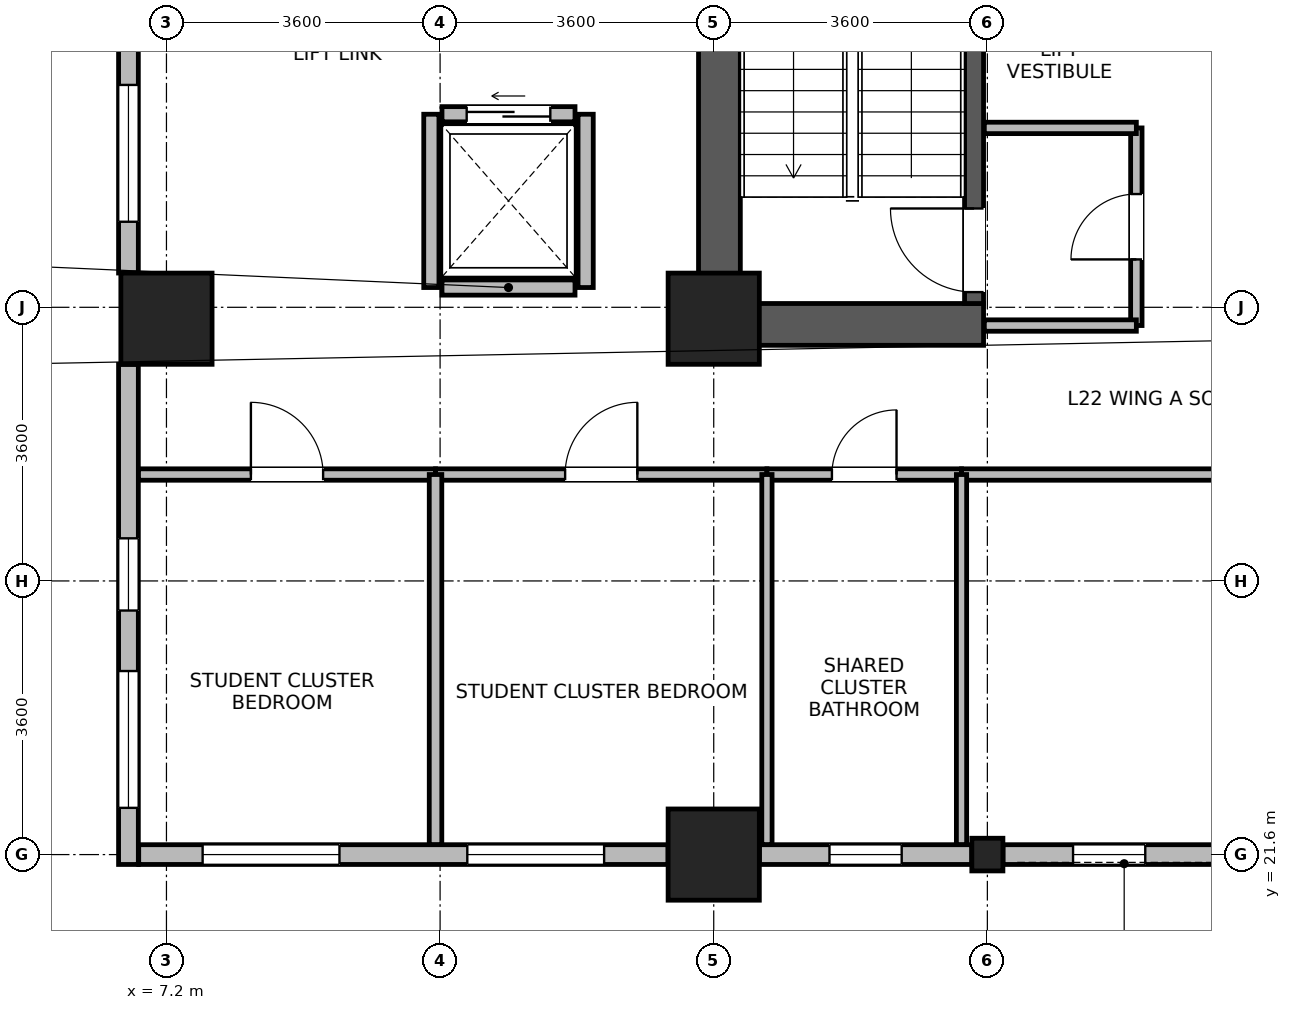
"""IFC4 building model, lengths in metres.
Left out: names, types, materials, properties, quantities, classifications, styles, units other than length and angle.
Written with IfcOpenShell. Run it as: python <this file> out.ifc"""

import sys

from ifc_helpers import new_model, si_unit, direction, frame, frame_2d, origin, origin_2d, place, context, subcontext, project, spatial, rectangle, i_section, extrude, source, transform, mapped, element, fill, save


model = new_model("IFC4")
c1 = context("Model", 3, precision=1e-05, world=origin(), true_north=direction((0.0, 1.0)))
c2 = subcontext(c1, "Body", "Model", "MODEL_VIEW")
j1 = project(units=[si_unit("LENGTHUNIT", "METRE"), si_unit("PLANEANGLEUNIT", "RADIAN")], contexts=[c1])
p1 = place(None, origin())
s1 = spatial("IfcSite", under=j1, at=p1, CompositionType="ELEMENT")
p2 = place(p1, origin())
s2 = spatial("IfcBuilding", under=s1, at=p2, CompositionType="ELEMENT")
p3 = place(p2, frame((0.0, 0.0, 89.7)))
s3 = spatial("IfcBuildingStorey", under=s2, at=p3, CompositionType="ELEMENT", Elevation=89.7)
p4 = place(p3, frame((14.475, 28.3, 0.0), z_axis=(0.0, 0.0, 1.0), x_axis=(0.0, 1.0, 0.0)))
e1 = element("IfcWall", 1, at=p4, inside=s3, PredefinedType="SHEAR", context=c2, shape_type="SweptSolid", body=[
    extrude(rectangle(XDim=8.1, YDim=0.55, at=frame_2d((4.05, 0.0))), origin(), (0.0, 0.0, 1.0), 3.45),
])
p5 = place(p3, frame((14.75, 28.575, 0.0), z_axis=(0.0, 0.0, 1.0), x_axis=(1.0, 0.0, 0.0)))
e2 = element("IfcWall", 2, at=p5, inside=s3, PredefinedType="SHEAR", context=c2, shape_type="SweptSolid", body=[
    extrude(rectangle(XDim=3.2, YDim=0.55, at=frame_2d((1.6, 0.0))), origin(), (0.0, 0.0, 1.0), 3.45),
])
p6 = place(p3, frame((17.825, 28.85, 0.0), z_axis=(0.0, 0.0, 1.0), x_axis=(0.0, 1.0, 0.0)))
e3 = element("IfcWall", 3, at=p6, inside=s3, PredefinedType="SHEAR", context=c2, shape_type="SweptSolid", body=[
    extrude(rectangle(XDim=7.0, YDim=0.25, at=frame_2d((3.5, 0.0))), origin(), (0.0, 0.0, 1.0), 3.45),
])
p7 = place(p6, frame((0.15, 0.0, 0.0)))
e4 = element("IfcOpeningElement", 4, at=p7, cuts=e3, PredefinedType="OPENING", context=c2, shape_type="SweptSolid", body=[
    extrude(rectangle(XDim=1.1, YDim=2.08, at=frame_2d((0.55, 1.04))), frame((0.0, 0.135, 0.0), z_axis=(0.0, -1.0, 0.0), x_axis=(1.0, 0.0, 0.0)), (0.0, 0.0, 1.0), 0.27),
])
m1 = source(origin(), c2, "Body", "SweptSolid", [
    extrude(rectangle(XDim=1.2, YDim=1.2, at=origin_2d()), origin(), (0.0, 0.0, 1.0), 3.7),
])
for number, where, z_axis, x_axis in (
    (5, (7.2, 28.65, 0.0), (0.0, 0.0, 1.0), (1.0, 0.0, 0.0)),
    (6, (14.4, 21.6, 0.0), (0.0, 0.0, 1.0), (1.0, 0.0, 0.0)),
    (7, (14.4, 28.65, 0.0), (0.0, 0.0, 1.0), (1.0, 0.0, 0.0)),
):
    element("IfcColumn", number, at=place(p3, frame(where, z_axis=z_axis, x_axis=x_axis)), inside=s3, PredefinedType="COLUMN", context=c2, shape_type="MappedRepresentation", body=[
        mapped(m1, transform((0.0, 0.0, 0.0), x_axis=(1.0, 0.0, 0.0), y_axis=(0.0, 1.0, 0.0), z_axis=(0.0, 0.0, 1.0), scale=1.0)),
    ])
m2 = source(origin(), c2, "Body", "SweptSolid", [
    extrude(i_section(OverallWidth=0.409, OverallDepth=0.43, WebThickness=0.024, FlangeThickness=0.033, FilletRadius=0.015, at=origin_2d()), origin(), (0.0, 0.0, 1.0), 3.7),
])
p8 = place(p3, frame((18.0, 21.6, 0.0), z_axis=(0.0, 0.0, 1.0), x_axis=(1.0, 0.0, 0.0)))
e8 = element("IfcColumn", 8, at=p8, inside=s3, PredefinedType="COLUMN", context=c2, shape_type="MappedRepresentation", body=[
    mapped(m2, transform((0.0, 0.0, 0.0), x_axis=(1.0, 0.0, 0.0), y_axis=(0.0, 1.0, 0.0), z_axis=(0.0, 0.0, 1.0), scale=1.0)),
])
p9 = place(p3, frame((6.7, 29.251, 0.0), z_axis=(0.0, 0.0, 1.0), x_axis=(0.0, 1.0, 0.0)))
e9 = element("IfcWall", 9, at=p9, inside=s3, PredefinedType="STANDARD", context=c2, shape_type="SweptSolid", body=[
    extrude(rectangle(XDim=6.298, YDim=0.26, at=frame_2d((3.149, 0.0))), origin(), (0.0, 0.0, 1.0), 3.43),
])
p10 = place(p9, frame((0.675, 0.0, 0.85)))
e10 = element("IfcOpeningElement", 10, at=p10, cuts=e9, PredefinedType="OPENING", context=c2, shape_type="SweptSolid", body=[
    extrude(rectangle(XDim=1.8, YDim=1.85, at=frame_2d((0.9, 0.925))), frame((0.0, 0.14, 0.0), z_axis=(0.0, -1.0, 0.0), x_axis=(1.0, 0.0, 0.0)), (0.0, 0.0, 1.0), 0.28),
])
p11 = place(p9, frame((3.823, 0.0, 0.85)))
e11 = element("IfcOpeningElement", 11, at=p11, cuts=e9, PredefinedType="OPENING", context=c2, shape_type="SweptSolid", body=[
    extrude(rectangle(XDim=1.8, YDim=1.85, at=frame_2d((0.9, 0.925))), frame((0.0, 0.14, 0.0), z_axis=(0.0, -1.0, 0.0), x_axis=(1.0, 0.0, 0.0)), (0.0, 0.0, 1.0), 0.28),
])
p12 = place(p3, frame((6.7, 21.47, 0.0), z_axis=(0.0, 0.0, 1.0), x_axis=(0.0, 1.0, 0.0)))
e12 = element("IfcWall", 12, at=p12, inside=s3, PredefinedType="STANDARD", context=c2, shape_type="SweptSolid", body=[
    extrude(rectangle(XDim=6.579, YDim=0.26, at=frame_2d((3.29, 0.0))), origin(), (0.0, 0.0, 1.0), 3.43),
])
p13 = place(p12, frame((0.745, 0.0, 0.85)))
e13 = element("IfcOpeningElement", 13, at=p13, cuts=e12, PredefinedType="OPENING", context=c2, shape_type="SweptSolid", body=[
    extrude(rectangle(XDim=1.8, YDim=1.85, at=frame_2d((0.9, 0.925))), frame((0.0, 0.14, 0.0), z_axis=(0.0, -1.0, 0.0), x_axis=(1.0, 0.0, 0.0)), (0.0, 0.0, 1.0), 0.28),
])
p14 = place(p12, frame((3.341, 0.0, 0.85)))
e14 = element("IfcOpeningElement", 14, at=p14, cuts=e12, PredefinedType="OPENING", context=c2, shape_type="SweptSolid", body=[
    extrude(rectangle(XDim=0.95, YDim=1.75, at=frame_2d((0.475, 0.875))), frame((0.0, 0.14, 0.0), z_axis=(0.0, -1.0, 0.0), x_axis=(1.0, 0.0, 0.0)), (0.0, 0.0, 1.0), 0.28),
])
p15 = place(p3, frame((13.799, 21.6, 0.0), z_axis=(0.0, 0.0, 1.0), x_axis=(-1.0, 0.0, 0.0)))
e15 = element("IfcWall", 15, at=p15, inside=s3, PredefinedType="STANDARD", context=c2, shape_type="SweptSolid", body=[
    extrude(rectangle(XDim=6.964, YDim=0.26, at=frame_2d((3.482, 0.0))), origin(), (0.0, 0.0, 1.0), 3.43),
])
p16 = place(p15, frame((0.841, 0.0, 0.85)))
e16 = element("IfcOpeningElement", 16, at=p16, cuts=e15, PredefinedType="OPENING", context=c2, shape_type="SweptSolid", body=[
    extrude(rectangle(XDim=1.8, YDim=1.85, at=frame_2d((0.9, 0.925))), frame((0.0, 0.14, 0.0), z_axis=(0.0, -1.0, 0.0), x_axis=(1.0, 0.0, 0.0)), (0.0, 0.0, 1.0), 0.28),
])
p17 = place(p15, frame((4.323, 0.0, 0.85)))
e17 = element("IfcOpeningElement", 17, at=p17, cuts=e15, PredefinedType="OPENING", context=c2, shape_type="SweptSolid", body=[
    extrude(rectangle(XDim=1.8, YDim=1.85, at=frame_2d((0.9, 0.925))), frame((0.0, 0.14, 0.0), z_axis=(0.0, -1.0, 0.0), x_axis=(1.0, 0.0, 0.0)), (0.0, 0.0, 1.0), 0.28),
])
p18 = place(p3, frame((17.794, 21.6, 0.0), z_axis=(0.0, 0.0, 1.0), x_axis=(-1.0, 0.0, 0.0)))
e18 = element("IfcWall", 18, at=p18, inside=s3, PredefinedType="STANDARD", context=c2, shape_type="SweptSolid", body=[
    extrude(rectangle(XDim=2.793, YDim=0.26, at=frame_2d((1.397, 0.0))), origin(), (0.0, 0.0, 1.0), 2.93),
])
p19 = place(p18, frame((0.922, 0.0, 0.85)))
e19 = element("IfcOpeningElement", 19, at=p19, cuts=e18, PredefinedType="OPENING", context=c2, shape_type="SweptSolid", body=[
    extrude(rectangle(XDim=0.95, YDim=1.75, at=frame_2d((0.475, 0.875))), frame((0.0, 0.14, 0.0), z_axis=(0.0, -1.0, 0.0), x_axis=(1.0, 0.0, 0.0)), (0.0, 0.0, 1.0), 0.28),
])
p20 = place(p3, frame((20.999, 21.6, 0.0), z_axis=(0.0, 0.0, 1.0), x_axis=(-1.0, 0.0, 0.0)))
e20 = element("IfcWall", 20, at=p20, inside=s3, PredefinedType="STANDARD", context=c2, shape_type="SweptSolid", body=[
    extrude(rectangle(XDim=2.793, YDim=0.26, at=frame_2d((1.397, 0.0))), origin(), (0.0, 0.0, 1.0), 2.93),
])
p21 = place(p20, frame((0.922, 0.0, 0.85)))
e21 = element("IfcOpeningElement", 21, at=p21, cuts=e20, PredefinedType="OPENING", context=c2, shape_type="SweptSolid", body=[
    extrude(rectangle(XDim=0.95, YDim=1.75, at=frame_2d((0.475, 0.875))), frame((0.0, 0.14, 0.0), z_axis=(0.0, -1.0, 0.0), x_axis=(1.0, 0.0, 0.0)), (0.0, 0.0, 1.0), 0.28),
])
p22 = place(p3, frame((10.825, 29.06, 0.0), z_axis=(0.0, 0.0, 1.0), x_axis=(1.0, 0.0, 0.0)))
e22 = element("IfcWall", 22, at=p22, inside=s3, PredefinedType="PARTITIONING", context=c2, shape_type="SweptSolid", body=[
    extrude(rectangle(XDim=1.75, YDim=0.2, at=frame_2d((0.875, 0.0))), origin(), (0.0, 0.0, 1.0), 3.43),
])
p23 = place(p3, frame((10.825, 31.34, 0.0), z_axis=(0.0, 0.0, 1.0), x_axis=(1.0, 0.0, 0.0)))
e23 = element("IfcWall", 23, at=p23, inside=s3, PredefinedType="PARTITIONING", context=c2, shape_type="SweptSolid", body=[
    extrude(rectangle(XDim=1.75, YDim=0.2, at=frame_2d((0.875, 0.0))), origin(), (0.0, 0.0, 1.0), 3.43),
])
p24 = place(p23, frame((0.325, 0.0, 0.0)))
e24 = element("IfcOpeningElement", 24, at=p24, cuts=e23, PredefinedType="OPENING", context=c2, shape_type="SweptSolid", body=[
    extrude(rectangle(XDim=1.1, YDim=2.12, at=frame_2d((0.55, 1.06))), frame((0.0, 0.11, 0.0), z_axis=(0.0, -1.0, 0.0), x_axis=(1.0, 0.0, 0.0)), (0.0, 0.0, 1.0), 0.22),
])
for number, where, z_axis, x_axis in (
    (25, (10.685, 29.06, 0.0), (0.0, 0.0, 1.0), (0.0, 1.0, 0.0)),
    (26, (12.715, 29.06, 0.0), (0.0, 0.0, 1.0), (0.0, 1.0, 0.0)),
):
    element("IfcWall", number, at=place(p3, frame(where, z_axis=z_axis, x_axis=x_axis)), inside=s3, PredefinedType="PARTITIONING", context=c2, shape_type="SweptSolid", body=[
        extrude(rectangle(XDim=2.28, YDim=0.2, at=frame_2d((1.14, 0.0))), origin(), (0.0, 0.0, 1.0), 3.43),
    ])
p25 = place(p3, frame((17.66, 26.6, 0.0), z_axis=(0.0, 0.0, 1.0), x_axis=(1.0, 0.0, 0.0)))
e27 = element("IfcWall", 27, at=p25, inside=s3, PredefinedType="PARTITIONING", context=c2, shape_type="SweptSolid", body=[
    extrude(rectangle(XDim=9.96, YDim=0.15, at=frame_2d((4.98, 0.0))), origin(), (0.0, 0.0, 1.0), 3.43),
])
p26 = place(p25, frame((4.33, 0.0, 0.0)))
e28 = element("IfcOpeningElement", 28, at=p26, cuts=e27, PredefinedType="OPENING", context=c2, shape_type="SweptSolid", body=[
    extrude(rectangle(XDim=1.3, YDim=2.12, at=frame_2d((0.65, 1.06))), frame((0.0, 0.085, 0.0), z_axis=(0.0, -1.0, 0.0), x_axis=(1.0, 0.0, 0.0)), (0.0, 0.0, 1.0), 0.17),
])
p27 = place(p3, frame((10.74, 26.6, 0.0), z_axis=(0.0, 0.0, 1.0), x_axis=(1.0, 0.0, 0.0)))
e29 = element("IfcWall", 29, at=p27, inside=s3, PredefinedType="PARTITIONING", context=c2, shape_type="SweptSolid", body=[
    extrude(rectangle(XDim=4.36, YDim=0.15, at=frame_2d((2.18, 0.0))), origin(), (0.0, 0.0, 1.0), 3.43),
])
p28 = place(p27, frame((1.705, 0.0, 0.0)))
e30 = element("IfcOpeningElement", 30, at=p28, cuts=e29, PredefinedType="OPENING", context=c2, shape_type="SweptSolid", body=[
    extrude(rectangle(XDim=0.95, YDim=2.1, at=frame_2d((0.475, 1.05))), frame((0.0, 0.085, 0.0), z_axis=(0.0, -1.0, 0.0), x_axis=(1.0, 0.0, 0.0)), (0.0, 0.0, 1.0), 0.17),
])
p29 = place(p3, frame((6.832, 26.6, 0.0), z_axis=(0.0, 0.0, 1.0), x_axis=(1.0, 0.0, 0.0)))
e31 = element("IfcWall", 31, at=p29, inside=s3, PredefinedType="PARTITIONING", context=c2, shape_type="SweptSolid", body=[
    extrude(rectangle(XDim=3.908, YDim=0.15, at=frame_2d((1.954, 0.0))), origin(), (0.0, 0.0, 1.0), 3.43),
])
p30 = place(p29, frame((1.479, 0.0, 0.0)))
e32 = element("IfcOpeningElement", 32, at=p30, cuts=e31, PredefinedType="OPENING", context=c2, shape_type="SweptSolid", body=[
    extrude(rectangle(XDim=0.95, YDim=2.1, at=frame_2d((0.475, 1.05))), frame((0.0, 0.085, 0.0), z_axis=(0.0, -1.0, 0.0), x_axis=(1.0, 0.0, 0.0)), (0.0, 0.0, 1.0), 0.17),
])
p31 = place(p3, frame((19.96, 28.56, 0.0), z_axis=(0.0, 0.0, 1.0), x_axis=(0.0, 1.0, 0.0)))
e33 = element("IfcWall", 33, at=p31, inside=s3, PredefinedType="PARTITIONING", context=c2, shape_type="SweptSolid", body=[
    extrude(rectangle(XDim=2.6, YDim=0.15, at=frame_2d((1.3, 0.0))), origin(), (0.0, 0.0, 1.0), 3.43),
])
p32 = place(p31, frame((0.87, 0.0, 0.0)))
e34 = element("IfcOpeningElement", 34, at=p32, cuts=e33, PredefinedType="OPENING", context=c2, shape_type="SweptSolid", body=[
    extrude(rectangle(XDim=0.86, YDim=2.02, at=frame_2d((0.43, 1.01))), frame((0.0, 0.085, 0.0), z_axis=(0.0, -1.0, 0.0), x_axis=(1.0, 0.0, 0.0)), (0.0, 0.0, 1.0), 0.17),
])
p33 = place(p3, frame((15.1, 26.6, 0.0), z_axis=(0.0, 0.0, 1.0), x_axis=(1.0, 0.0, 0.0)))
e35 = element("IfcWall", 35, at=p33, inside=s3, PredefinedType="PARTITIONING", context=c2, shape_type="SweptSolid", body=[
    extrude(rectangle(XDim=2.56, YDim=0.15, at=frame_2d((1.28, 0.0))), origin(), (0.0, 0.0, 1.0), 3.43),
])
p34 = place(p33, frame((0.855, 0.0, 0.0)))
e36 = element("IfcOpeningElement", 36, at=p34, cuts=e35, PredefinedType="OPENING", context=c2, shape_type="SweptSolid", body=[
    extrude(rectangle(XDim=0.85, YDim=2.04, at=frame_2d((0.425, 1.02))), frame((0.0, 0.085, 0.0), z_axis=(0.0, -1.0, 0.0), x_axis=(1.0, 0.0, 0.0)), (0.0, 0.0, 1.0), 0.17),
])
p35 = place(p3, frame((17.96, 28.56, 0.0), z_axis=(0.0, 0.0, 1.0), x_axis=(1.0, 0.0, 0.0)))
e37 = element("IfcWall", 37, at=p35, inside=s3, PredefinedType="PARTITIONING", context=c2, shape_type="SweptSolid", body=[
    extrude(rectangle(XDim=2.0, YDim=0.15, at=frame_2d((1.0, 0.0))), origin(), (0.0, 0.0, 1.0), 2.23),
])
p36 = place(p3, frame((17.96, 31.16, 0.0), z_axis=(0.0, 0.0, 1.0), x_axis=(1.0, 0.0, 0.0)))
e38 = element("IfcWall", 38, at=p36, inside=s3, PredefinedType="PARTITIONING", context=c2, shape_type="SweptSolid", body=[
    extrude(rectangle(XDim=2.0, YDim=0.15, at=frame_2d((1.0, 0.0))), origin(), (0.0, 0.0, 1.0), 3.43),
])
p37 = place(p3, frame((10.74, 21.732, 0.0), z_axis=(0.0, 0.0, 1.0), x_axis=(0.0, 1.0, 0.0)))
e39 = element("IfcWall", 39, at=p37, inside=s3, PredefinedType="PARTITIONING", context=c2, shape_type="SweptSolid", body=[
    extrude(rectangle(XDim=4.868, YDim=0.165, at=frame_2d((2.434, 0.0))), origin(), (0.0, 0.0, 1.0), 3.43),
])
for number, where, z_axis, x_axis in (
    (40, (15.1, 21.732, 0.0), (0.0, 0.0, 1.0), (0.0, 1.0, 0.0)),
    (41, (17.66, 21.732, 0.0), (0.0, 0.0, 1.0), (0.0, 1.0, 0.0)),
):
    element("IfcWall", number, at=place(p3, frame(where, z_axis=z_axis, x_axis=x_axis)), inside=s3, PredefinedType="PARTITIONING", context=c2, shape_type="SweptSolid", body=[
        extrude(rectangle(XDim=4.868, YDim=0.135, at=frame_2d((2.434, 0.0))), origin(), (0.0, 0.0, 1.0), 3.43),
    ])
p38 = place(p10, origin())
e42 = element("IfcWindow", 42, at=p38, inside=s3, PartitioningType="SINGLE_PANEL", PredefinedType="WINDOW", context=c2, shape_type="SweptSolid", body=[
    extrude(rectangle(XDim=1.8, YDim=1.85, at=frame_2d((0.9, 0.925))), frame((0.0, 0.03, 0.0), z_axis=(0.0, -1.0, 0.0), x_axis=(1.0, 0.0, 0.0)), (0.0, 0.0, 1.0), 0.06),
])
fill(e10, e42)
p39 = place(p13, origin())
e43 = element("IfcWindow", 43, at=p39, inside=s3, PartitioningType="SINGLE_PANEL", PredefinedType="WINDOW", context=c2, shape_type="SweptSolid", body=[
    extrude(rectangle(XDim=1.8, YDim=1.85, at=frame_2d((0.9, 0.925))), frame((0.0, 0.03, 0.0), z_axis=(0.0, -1.0, 0.0), x_axis=(1.0, 0.0, 0.0)), (0.0, 0.0, 1.0), 0.06),
])
fill(e13, e43)
p40 = place(p14, origin())
e44 = element("IfcWindow", 44, at=p40, inside=s3, PartitioningType="SINGLE_PANEL", PredefinedType="WINDOW", context=c2, shape_type="SweptSolid", body=[
    extrude(rectangle(XDim=0.95, YDim=1.75, at=frame_2d((0.475, 0.875))), frame((0.0, 0.03, 0.0), z_axis=(0.0, -1.0, 0.0), x_axis=(1.0, 0.0, 0.0)), (0.0, 0.0, 1.0), 0.06),
])
fill(e14, e44)
p41 = place(p16, origin())
e45 = element("IfcWindow", 45, at=p41, inside=s3, PartitioningType="SINGLE_PANEL", PredefinedType="WINDOW", context=c2, shape_type="SweptSolid", body=[
    extrude(rectangle(XDim=1.8, YDim=1.85, at=frame_2d((0.9, 0.925))), frame((0.0, 0.03, 0.0), z_axis=(0.0, -1.0, 0.0), x_axis=(1.0, 0.0, 0.0)), (0.0, 0.0, 1.0), 0.06),
])
fill(e16, e45)
p42 = place(p17, origin())
e46 = element("IfcWindow", 46, at=p42, inside=s3, PartitioningType="SINGLE_PANEL", PredefinedType="WINDOW", context=c2, shape_type="SweptSolid", body=[
    extrude(rectangle(XDim=1.8, YDim=1.85, at=frame_2d((0.9, 0.925))), frame((0.0, 0.03, 0.0), z_axis=(0.0, -1.0, 0.0), x_axis=(1.0, 0.0, 0.0)), (0.0, 0.0, 1.0), 0.06),
])
fill(e17, e46)
p43 = place(p19, origin())
e47 = element("IfcWindow", 47, at=p43, inside=s3, PartitioningType="SINGLE_PANEL", PredefinedType="WINDOW", context=c2, shape_type="SweptSolid", body=[
    extrude(rectangle(XDim=0.95, YDim=1.75, at=frame_2d((0.475, 0.875))), frame((0.0, 0.03, 0.0), z_axis=(0.0, -1.0, 0.0), x_axis=(1.0, 0.0, 0.0)), (0.0, 0.0, 1.0), 0.06),
])
fill(e19, e47)
p44 = place(p21, origin())
e48 = element("IfcWindow", 48, at=p44, inside=s3, PartitioningType="SINGLE_PANEL", PredefinedType="WINDOW", context=c2, shape_type="SweptSolid", body=[
    extrude(rectangle(XDim=0.95, YDim=1.75, at=frame_2d((0.475, 0.875))), frame((0.0, 0.03, 0.0), z_axis=(0.0, -1.0, 0.0), x_axis=(1.0, 0.0, 0.0)), (0.0, 0.0, 1.0), 0.06),
])
fill(e21, e48)
p45 = place(p7, origin())
e49 = element("IfcDoor", 49, at=p45, inside=s3, OperationType="SINGLE_SWING_RIGHT", PredefinedType="DOOR", context=c2, shape_type="SweptSolid", body=[
    extrude(rectangle(XDim=1.1, YDim=2.08, at=frame_2d((0.55, 1.04))), frame((0.0, 0.025, 0.0), z_axis=(0.0, -1.0, 0.0), x_axis=(1.0, 0.0, 0.0)), (0.0, 0.0, 1.0), 0.05),
])
fill(e4, e49)
p46 = place(p24, origin())
e50 = element("IfcDoor", 50, at=p46, inside=s3, OperationType="SLIDING_TO_LEFT", PredefinedType="DOOR", context=c2, shape_type="SweptSolid", body=[
    extrude(rectangle(XDim=1.1, YDim=2.12, at=frame_2d((0.55, 1.06))), frame((0.0, 0.025, 0.0), z_axis=(0.0, -1.0, 0.0), x_axis=(1.0, 0.0, 0.0)), (0.0, 0.0, 1.0), 0.05),
])
fill(e24, e50)
p47 = place(p28, origin())
e51 = element("IfcDoor", 51, at=p47, inside=s3, OperationType="SINGLE_SWING_RIGHT", PredefinedType="DOOR", context=c2, shape_type="SweptSolid", body=[
    extrude(rectangle(XDim=0.95, YDim=2.1, at=frame_2d((0.475, 1.05))), frame((0.0, 0.025, 0.0), z_axis=(0.0, -1.0, 0.0), x_axis=(1.0, 0.0, 0.0)), (0.0, 0.0, 1.0), 0.05),
])
fill(e30, e51)
p48 = place(p30, origin())
e52 = element("IfcDoor", 52, at=p48, inside=s3, OperationType="SINGLE_SWING_LEFT", PredefinedType="DOOR", context=c2, shape_type="SweptSolid", body=[
    extrude(rectangle(XDim=0.95, YDim=2.1, at=frame_2d((0.475, 1.05))), frame((0.0, 0.025, 0.0), z_axis=(0.0, -1.0, 0.0), x_axis=(1.0, 0.0, 0.0)), (0.0, 0.0, 1.0), 0.05),
])
fill(e32, e52)
p49 = place(p32, origin())
e53 = element("IfcDoor", 53, at=p49, inside=s3, OperationType="SINGLE_SWING_LEFT", PredefinedType="DOOR", context=c2, shape_type="SweptSolid", body=[
    extrude(rectangle(XDim=0.86, YDim=2.02, at=frame_2d((0.43, 1.01))), frame((0.0, 0.025, 0.0), z_axis=(0.0, -1.0, 0.0), x_axis=(1.0, 0.0, 0.0)), (0.0, 0.0, 1.0), 0.05),
])
fill(e34, e53)
p50 = place(p34, origin())
e54 = element("IfcDoor", 54, at=p50, inside=s3, OperationType="SINGLE_SWING_RIGHT", PredefinedType="DOOR", context=c2, shape_type="SweptSolid", body=[
    extrude(rectangle(XDim=0.85, YDim=2.04, at=frame_2d((0.425, 1.02))), frame((0.0, 0.025, 0.0), z_axis=(0.0, -1.0, 0.0), x_axis=(1.0, 0.0, 0.0)), (0.0, 0.0, 1.0), 0.05),
])
fill(e36, e54)
save(model, sys.argv[1])
